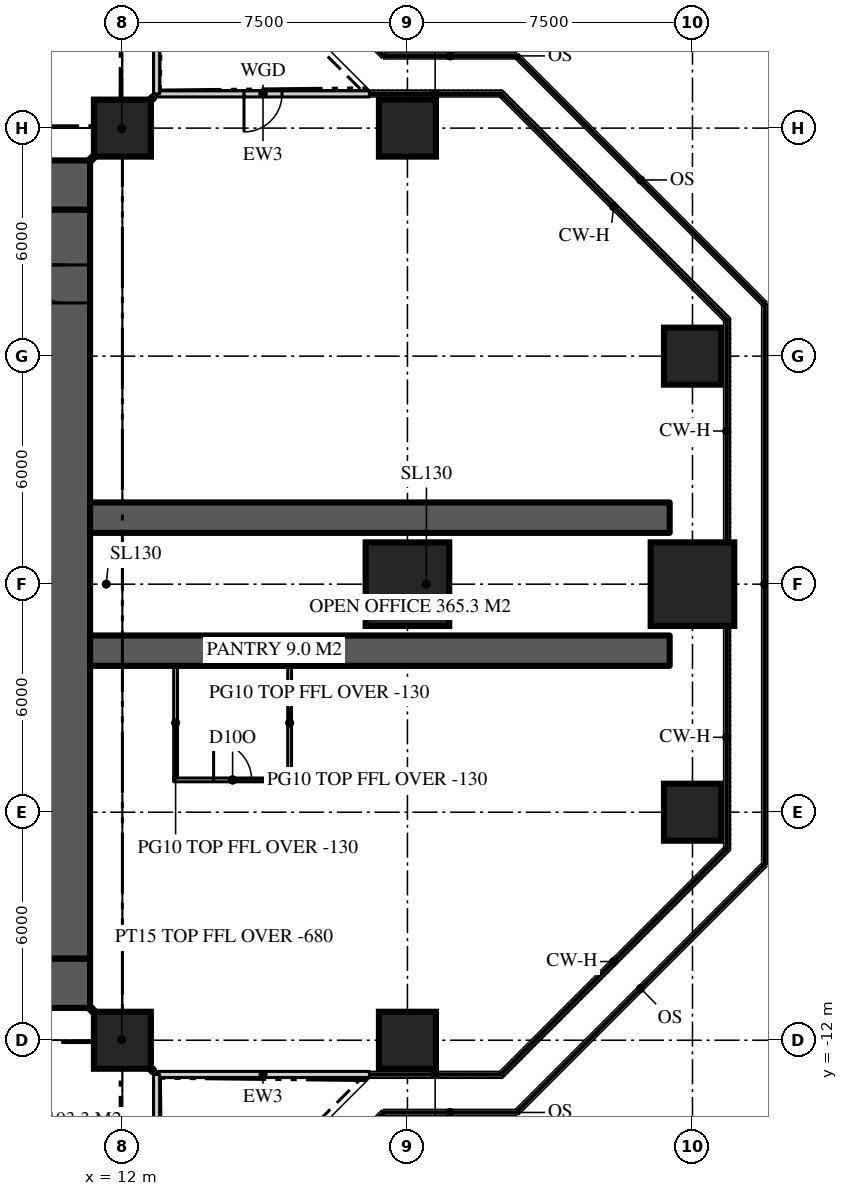
"""IFC4 building model, lengths in metres.
Left out: names, types, materials, properties, quantities, classifications, styles, units other than length and angle.
Written with IfcOpenShell. Run it as: python <this file> out.ifc"""

import sys

from ifc_helpers import new_model, si_unit, direction, frame, frame_2d, origin, origin_2d, place, context, subcontext, project, spatial, rectangle, extrude, element, fill, save


model = new_model("IFC4")
c1 = context("Model", 3, precision=1e-05, world=origin(), true_north=direction((0.0, 1.0)))
c2 = subcontext(c1, "Body", "Model", "MODEL_VIEW")
j1 = project(units=[si_unit("LENGTHUNIT", "METRE"), si_unit("PLANEANGLEUNIT", "RADIAN")], contexts=[c1])
p1 = place(None, origin())
s1 = spatial("IfcSite", under=j1, at=p1, CompositionType="ELEMENT")
p2 = place(p1, origin())
s2 = spatial("IfcBuilding", under=s1, at=p2, CompositionType="ELEMENT")
p3 = place(p2, frame((0.0, 0.0, 220.5)))
s3 = spatial("IfcBuildingStorey", under=s2, at=p3, CompositionType="ELEMENT", Elevation=220.5)
p4 = place(p3, frame((-11.15, 10.5, 0.0), z_axis=(0.0, 0.0, 1.0), x_axis=(1.0, 0.0, 0.0)))
e1 = element("IfcWall", 1, at=p4, inside=s3, PredefinedType="SHEAR", context=c2, shape_type="SweptSolid", body=[
    extrude(rectangle(XDim=22.3, YDim=1.3, at=frame_2d((11.15, 0.0))), origin(), (0.0, 0.0, 1.0), 3.9),
])
p5 = place(p4, frame((4.25, 0.0, 0.0)))
e2 = element("IfcOpeningElement", 2, at=p5, cuts=e1, PredefinedType="OPENING", context=c2, shape_type="SweptSolid", body=[
    extrude(rectangle(XDim=1.8, YDim=2.2, at=frame_2d((0.9, 1.1))), frame((0.0, 0.66, 0.0), z_axis=(0.0, -1.0, 0.0), x_axis=(1.0, 0.0, 0.0)), (0.0, 0.0, 1.0), 1.32),
])
p6 = place(p4, frame((16.25, 0.0, 0.0)))
e3 = element("IfcOpeningElement", 3, at=p6, cuts=e1, PredefinedType="OPENING", context=c2, shape_type="SweptSolid", body=[
    extrude(rectangle(XDim=1.8, YDim=2.2, at=frame_2d((0.9, 1.1))), frame((0.0, 0.66, 0.0), z_axis=(0.0, -1.0, 0.0), x_axis=(1.0, 0.0, 0.0)), (0.0, 0.0, 1.0), 1.32),
])
p7 = place(p3, frame((11.15, -10.5, 0.0), z_axis=(0.0, 0.0, 1.0), x_axis=(-1.0, 0.0, 0.0)))
e4 = element("IfcWall", 4, at=p7, inside=s3, PredefinedType="SHEAR", context=c2, shape_type="SweptSolid", body=[
    extrude(rectangle(XDim=22.3, YDim=1.3, at=frame_2d((11.15, 0.0))), origin(), (0.0, 0.0, 1.0), 3.9),
])
p8 = place(p7, frame((16.25, 0.0, 0.0)))
e5 = element("IfcOpeningElement", 5, at=p8, cuts=e4, PredefinedType="OPENING", context=c2, shape_type="SweptSolid", body=[
    extrude(rectangle(XDim=1.8, YDim=2.2, at=frame_2d((0.9, 1.1))), frame((0.0, 0.66, 0.0), z_axis=(0.0, -1.0, 0.0), x_axis=(1.0, 0.0, 0.0)), (0.0, 0.0, 1.0), 1.32),
])
p9 = place(p7, frame((4.25, 0.0, 0.0)))
e6 = element("IfcOpeningElement", 6, at=p9, cuts=e4, PredefinedType="OPENING", context=c2, shape_type="SweptSolid", body=[
    extrude(rectangle(XDim=1.8, YDim=2.2, at=frame_2d((0.9, 1.1))), frame((0.0, 0.66, 0.0), z_axis=(0.0, -1.0, 0.0), x_axis=(1.0, 0.0, 0.0)), (0.0, 0.0, 1.0), 1.32),
])
p10 = place(p3, frame((10.5, -9.85, 0.0), z_axis=(0.0, 0.0, 1.0), x_axis=(0.0, 1.0, 0.0)))
e7 = element("IfcWall", 7, at=p10, inside=s3, PredefinedType="SHEAR", context=c2, shape_type="SweptSolid", body=[
    extrude(rectangle(XDim=19.7, YDim=1.3, at=frame_2d((9.85, 0.0))), origin(), (0.0, 0.0, 1.0), 3.9),
])
p11 = place(p10, frame((17.25, 0.0, 0.0)))
e8 = element("IfcOpeningElement", 8, at=p11, cuts=e7, PredefinedType="OPENING", context=c2, shape_type="SweptSolid", body=[
    extrude(rectangle(XDim=1.0, YDim=2.2, at=frame_2d((0.5, 1.1))), frame((0.0, 0.66, 0.0), z_axis=(0.0, -1.0, 0.0), x_axis=(1.0, 0.0, 0.0)), (0.0, 0.0, 1.0), 1.32),
])
for number, where, z_axis, x_axis in (
    (9, (11.15, -1.75, 0.0), (0.0, 0.0, 1.0), (1.0, 0.0, 0.0)),
    (10, (11.15, 1.75, 0.0), (0.0, 0.0, 1.0), (1.0, 0.0, 0.0)),
):
    element("IfcWall", number, at=place(p3, frame(where, z_axis=z_axis, x_axis=x_axis)), inside=s3, PredefinedType="SHEAR", context=c2, shape_type="SweptSolid", body=[
        extrude(rectangle(XDim=15.25, YDim=0.8, at=frame_2d((7.625, 0.0))), origin(), (0.0, 0.0, 1.0), 3.9),
    ])
for number, where, z_axis, x_axis in (
    (11, (12.0, -12.0, 0.0), (0.0, 0.0, 1.0), (1.0, 0.0, 0.0)),
    (12, (19.5, -12.0, 0.0), (0.0, 0.0, 1.0), (1.0, 0.0, 0.0)),
    (13, (27.0, -6.0, 0.0), (0.0, 0.0, 1.0), (1.0, 0.0, 0.0)),
):
    element("IfcColumn", number, at=place(p3, frame(where, z_axis=z_axis, x_axis=x_axis)), inside=s3, PredefinedType="COLUMN", context=c2, shape_type="SweptSolid", body=[
        extrude(rectangle(XDim=1.5, YDim=1.5, at=origin_2d()), origin(), (0.0, 0.0, 1.0), 3.9),
    ])
for number, where, z_axis, x_axis in (
    (14, (19.5, 0.0, 0.0), (0.0, 0.0, 1.0), (1.0, 0.0, 0.0)),
    (15, (27.0, 0.0, 0.0), (0.0, 0.0, 1.0), (1.0, 0.0, 0.0)),
):
    element("IfcColumn", number, at=place(p3, frame(where, z_axis=z_axis, x_axis=x_axis)), inside=s3, PredefinedType="COLUMN", context=c2, shape_type="SweptSolid", body=[
        extrude(rectangle(XDim=2.2, YDim=2.2, at=origin_2d()), origin(), (0.0, 0.0, 1.0), 3.9),
    ])
for number, where, z_axis, x_axis in (
    (16, (27.0, 6.0, 0.0), (0.0, 0.0, 1.0), (1.0, 0.0, 0.0)),
    (17, (12.0, 12.0, 0.0), (0.0, 0.0, 1.0), (1.0, 0.0, 0.0)),
    (18, (19.5, 12.0, 0.0), (0.0, 0.0, 1.0), (1.0, 0.0, 0.0)),
):
    element("IfcColumn", number, at=place(p3, frame(where, z_axis=z_axis, x_axis=x_axis)), inside=s3, PredefinedType="COLUMN", context=c2, shape_type="SweptSolid", body=[
        extrude(rectangle(XDim=1.5, YDim=1.5, at=origin_2d()), origin(), (0.0, 0.0, 1.0), 3.9),
    ])
p12 = place(p3, frame((12.9, -12.9, 0.0), z_axis=(0.0, 0.0, 1.0), x_axis=(1.0, 0.0, 0.0)))
e19 = element("IfcWall", 19, at=p12, inside=s3, PredefinedType="SOLIDWALL", context=c2, shape_type="SweptSolid", body=[
    extrude(rectangle(XDim=5.6, YDim=0.16, at=frame_2d((2.8, 0.0))), origin(), (0.0, 0.0, 1.0), 3.77),
])
p13 = place(p3, frame((18.5, 12.9, 0.0), z_axis=(0.0, 0.0, 1.0), x_axis=(-1.0, 0.0, 0.0)))
e20 = element("IfcWall", 20, at=p13, inside=s3, PredefinedType="SOLIDWALL", context=c2, shape_type="SweptSolid", body=[
    extrude(rectangle(XDim=5.6, YDim=0.16, at=frame_2d((2.8, 0.0))), origin(), (0.0, 0.0, 1.0), 3.77),
])
p14 = place(p13, frame((2.3, 0.0, 0.0)))
e21 = element("IfcOpeningElement", 21, at=p14, cuts=e20, PredefinedType="OPENING", context=c2, shape_type="SweptSolid", body=[
    extrude(rectangle(XDim=1.0, YDim=2.2, at=frame_2d((0.5, 1.1))), frame((0.0, 0.09, 0.0), z_axis=(0.0, -1.0, 0.0), x_axis=(1.0, 0.0, 0.0)), (0.0, 0.0, 1.0), 0.18),
])
p15 = place(p3, frame((12.9, 12.9, 0.0), z_axis=(0.0, 0.0, 1.0), x_axis=(0.0, 1.0, 0.0)))
e22 = element("IfcWall", 22, at=p15, inside=s3, PredefinedType="SOLIDWALL", context=c2, shape_type="SweptSolid", body=[
    extrude(rectangle(XDim=5.6, YDim=0.16, at=frame_2d((2.8, 0.0))), origin(), (0.0, 0.0, 1.0), 3.77),
])
p16 = place(p3, frame((12.9, -18.5, 0.0), z_axis=(0.0, 0.0, 1.0), x_axis=(0.0, 1.0, 0.0)))
e23 = element("IfcWall", 23, at=p16, inside=s3, PredefinedType="SOLIDWALL", context=c2, shape_type="SweptSolid", body=[
    extrude(rectangle(XDim=5.6, YDim=0.16, at=frame_2d((2.8, 0.0))), origin(), (0.0, 0.0, 1.0), 3.77),
])
p17 = place(p16, frame((2.3, 0.0, 0.0)))
e24 = element("IfcOpeningElement", 24, at=p17, cuts=e23, PredefinedType="OPENING", context=c2, shape_type="SweptSolid", body=[
    extrude(rectangle(XDim=1.0, YDim=2.2, at=frame_2d((0.5, 1.1))), frame((0.0, 0.09, 0.0), z_axis=(0.0, -1.0, 0.0), x_axis=(1.0, 0.0, 0.0)), (0.0, 0.0, 1.0), 0.18),
])
for number, where, z_axis, x_axis in (
    (25, (13.4, -2.15, 0.0), (0.0, 0.0, 1.0), (0.0, -1.0, 0.0)),
    (26, (16.4, -2.15, 0.0), (0.0, 0.0, 1.0), (0.0, -1.0, 0.0)),
):
    element("IfcWall", number, at=place(p3, frame(where, z_axis=z_axis, x_axis=x_axis)), inside=s3, PredefinedType="PARTITIONING", context=c2, shape_type="SweptSolid", body=[
        extrude(rectangle(XDim=3.0, YDim=0.1, at=frame_2d((1.5, 0.0))), origin(), (0.0, 0.0, 1.0), 3.77),
    ])
p18 = place(p3, frame((13.35, -5.15, 0.0), z_axis=(0.0, 0.0, 1.0), x_axis=(1.0, 0.0, 0.0)))
e27 = element("IfcWall", 27, at=p18, inside=s3, PredefinedType="PARTITIONING", context=c2, shape_type="SweptSolid", body=[
    extrude(rectangle(XDim=3.1, YDim=0.1, at=frame_2d((1.55, 0.0))), origin(), (0.0, 0.0, 1.0), 3.77),
])
p19 = place(p18, frame((1.05, 0.0, 0.0)))
e28 = element("IfcOpeningElement", 28, at=p19, cuts=e27, PredefinedType="OPENING", context=c2, shape_type="SweptSolid", body=[
    extrude(rectangle(XDim=1.0, YDim=2.2, at=frame_2d((0.5, 1.1))), frame((0.0, 0.06, 0.0), z_axis=(0.0, -1.0, 0.0), x_axis=(1.0, 0.0, 0.0)), (0.0, 0.0, 1.0), 0.12),
])
for number, where, z_axis, x_axis in (
    (29, (11.15, 11.15, 0.0), (0.0, 0.0, 1.0), (0.707, 0.707, 0.0)),
    (30, (11.15, -11.15, 0.0), (0.0, 0.0, 1.0), (0.707, -0.707, 0.0)),
):
    element("IfcWall", number, at=place(p3, frame(where, z_axis=z_axis, x_axis=x_axis)), inside=s3, PredefinedType="PARTITIONING", context=c2, shape_type="SweptSolid", body=[
        extrude(rectangle(XDim=2.362, YDim=0.15, at=frame_2d((1.181, 0.0))), origin(), (0.0, 0.0, 1.0), 3.22),
    ])
p20 = place(p14, origin())
e31 = element("IfcDoor", 31, at=p20, inside=s3, OperationType="SINGLE_SWING_RIGHT", PredefinedType="DOOR", context=c2, shape_type="SweptSolid", body=[
    extrude(rectangle(XDim=1.0, YDim=2.2, at=frame_2d((0.5, 1.1))), frame((0.0, 0.025, 0.0), z_axis=(0.0, -1.0, 0.0), x_axis=(1.0, 0.0, 0.0)), (0.0, 0.0, 1.0), 0.05),
])
fill(e21, e31)
p21 = place(p11, origin())
e32 = element("IfcDoor", 32, at=p21, inside=s3, OperationType="SINGLE_SWING_RIGHT", PredefinedType="DOOR", context=c2, shape_type="SweptSolid", body=[
    extrude(rectangle(XDim=1.0, YDim=2.2, at=frame_2d((0.5, 1.1))), frame((0.0, 0.025, 0.0), z_axis=(0.0, -1.0, 0.0), x_axis=(1.0, 0.0, 0.0)), (0.0, 0.0, 1.0), 0.05),
])
fill(e8, e32)
p22 = place(p19, origin())
e33 = element("IfcDoor", 33, at=p22, inside=s3, OperationType="SINGLE_SWING_LEFT", PredefinedType="DOOR", context=c2, shape_type="SweptSolid", body=[
    extrude(rectangle(XDim=1.0, YDim=2.2, at=frame_2d((0.5, 1.1))), frame((0.0, 0.025, 0.0), z_axis=(0.0, -1.0, 0.0), x_axis=(1.0, 0.0, 0.0)), (0.0, 0.0, 1.0), 0.05),
])
fill(e28, e33)
save(model, sys.argv[1])
